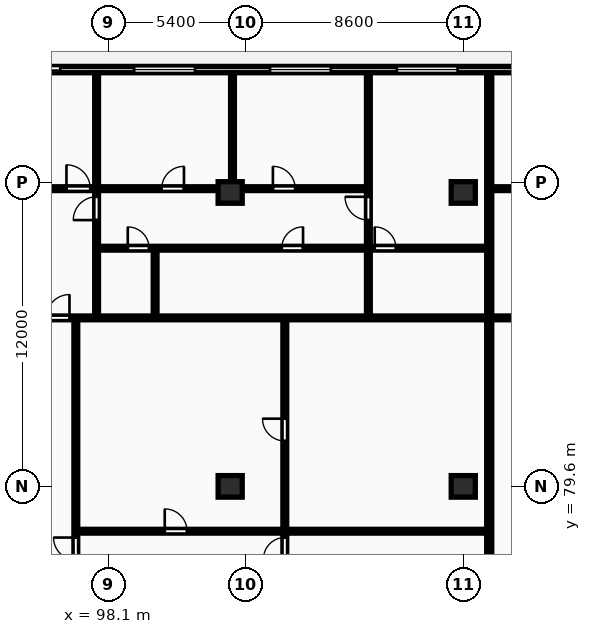
"""IFC4 building model, lengths in metres.
Left out: names, types, materials, properties, quantities, classifications, styles, units other than length and angle.
Written with IfcOpenShell. Run it as: python <this file> out.ifc"""

import sys

from ifc_helpers import new_model, si_unit, direction, frame, frame_2d, origin, origin_2d, place, context, subcontext, project, spatial, rectangle, extrude, element, fill, save


model = new_model("IFC4")
c1 = context("Model", 3, precision=1e-05, world=origin(), true_north=direction((0.0, 1.0)))
c2 = subcontext(c1, "Body", "Model", "MODEL_VIEW")
j1 = project(units=[si_unit("LENGTHUNIT", "METRE"), si_unit("PLANEANGLEUNIT", "RADIAN")], contexts=[c1])
p1 = place(None, origin())
s1 = spatial("IfcSite", under=j1, at=p1, CompositionType="ELEMENT")
p2 = place(p1, origin())
s2 = spatial("IfcBuilding", under=s1, at=p2, CompositionType="ELEMENT")
p3 = place(p2, frame((0.0, 0.0, 126.3)))
s3 = spatial("IfcBuildingStorey", under=s2, at=p3, CompositionType="ELEMENT", Elevation=126.3)
for number, where, z_axis, x_axis in (
    (1, (102.9, 79.6, 0.0), (0.0, 0.0, 1.0), (1.0, 0.0, 0.0)),
    (2, (102.9, 91.2, 0.0), (0.0, 0.0, 1.0), (1.0, 0.0, 0.0)),
    (3, (112.1, 79.6, 0.0), (0.0, 0.0, 1.0), (1.0, 0.0, 0.0)),
    (4, (112.1, 91.2, 0.0), (0.0, 0.0, 1.0), (1.0, 0.0, 0.0)),
):
    element("IfcColumn", number, at=place(p3, frame(where, z_axis=z_axis, x_axis=x_axis)), inside=s3, PredefinedType="COLUMN", context=c2, shape_type="SweptSolid", body=[
        extrude(rectangle(XDim=0.95, YDim=0.85, at=origin_2d()), origin(), (0.0, 0.0, 1.0), 3.25),
    ])
p4 = place(p3, frame((130.6, 96.05, 0.0), z_axis=(0.0, 0.0, 1.0), x_axis=(-1.0, 0.0, 0.0)))
e5 = element("IfcWall", 5, at=p4, inside=s3, PredefinedType="STANDARD", context=c2, shape_type="SweptSolid", body=[
    extrude(rectangle(XDim=73.0, YDim=0.25, at=frame_2d((36.5, 0.0))), origin(), (0.0, 0.0, 1.0), 2.97),
])
p5 = place(p4, frame((68.591, 0.0, 0.0)))
e6 = element("IfcOpeningElement", 6, at=p5, cuts=e5, PredefinedType="OPENING", context=c2, shape_type="SweptSolid", body=[
    extrude(rectangle(XDim=1.8, YDim=2.2, at=frame_2d((0.9, 1.1))), frame((0.0, 0.135, 0.0), z_axis=(0.0, -1.0, 0.0), x_axis=(1.0, 0.0, 0.0)), (0.0, 0.0, 1.0), 0.27),
])
p6 = place(p4, frame((60.092, 0.0, 0.85)))
e7 = element("IfcOpeningElement", 7, at=p6, cuts=e5, PredefinedType="OPENING", context=c2, shape_type="SweptSolid", body=[
    extrude(rectangle(XDim=2.4, YDim=1.9, at=frame_2d((1.2, 0.95))), frame((0.0, 0.135, 0.0), z_axis=(0.0, -1.0, 0.0), x_axis=(1.0, 0.0, 0.0)), (0.0, 0.0, 1.0), 0.27),
])
p7 = place(p4, frame((51.405, 0.0, 0.0)))
e8 = element("IfcOpeningElement", 8, at=p7, cuts=e5, PredefinedType="OPENING", context=c2, shape_type="SweptSolid", body=[
    extrude(rectangle(XDim=1.8, YDim=2.2, at=frame_2d((0.9, 1.1))), frame((0.0, 0.135, 0.0), z_axis=(0.0, -1.0, 0.0), x_axis=(1.0, 0.0, 0.0)), (0.0, 0.0, 1.0), 0.27),
])
p8 = place(p4, frame((41.925, 0.0, 0.85)))
e9 = element("IfcOpeningElement", 9, at=p8, cuts=e5, PredefinedType="OPENING", context=c2, shape_type="SweptSolid", body=[
    extrude(rectangle(XDim=2.4, YDim=1.9, at=frame_2d((1.2, 0.95))), frame((0.0, 0.135, 0.0), z_axis=(0.0, -1.0, 0.0), x_axis=(1.0, 0.0, 0.0)), (0.0, 0.0, 1.0), 0.27),
])
p9 = place(p4, frame((29.091, 0.0, 0.85)))
e10 = element("IfcOpeningElement", 10, at=p9, cuts=e5, PredefinedType="OPENING", context=c2, shape_type="SweptSolid", body=[
    extrude(rectangle(XDim=2.4, YDim=1.9, at=frame_2d((1.2, 0.95))), frame((0.0, 0.135, 0.0), z_axis=(0.0, -1.0, 0.0), x_axis=(1.0, 0.0, 0.0)), (0.0, 0.0, 1.0), 0.27),
])
p10 = place(p4, frame((23.727, 0.0, 0.85)))
e11 = element("IfcOpeningElement", 11, at=p10, cuts=e5, PredefinedType="OPENING", context=c2, shape_type="SweptSolid", body=[
    extrude(rectangle(XDim=2.4, YDim=1.9, at=frame_2d((1.2, 0.95))), frame((0.0, 0.135, 0.0), z_axis=(0.0, -1.0, 0.0), x_axis=(1.0, 0.0, 0.0)), (0.0, 0.0, 1.0), 0.27),
])
p11 = place(p4, frame((34.407, 0.0, 0.0)))
e12 = element("IfcOpeningElement", 12, at=p11, cuts=e5, PredefinedType="OPENING", context=c2, shape_type="SweptSolid", body=[
    extrude(rectangle(XDim=1.8, YDim=2.2, at=frame_2d((0.9, 1.1))), frame((0.0, 0.135, 0.0), z_axis=(0.0, -1.0, 0.0), x_axis=(1.0, 0.0, 0.0)), (0.0, 0.0, 1.0), 0.27),
])
p12 = place(p4, frame((18.72, 0.0, 0.85)))
e13 = element("IfcOpeningElement", 13, at=p12, cuts=e5, PredefinedType="OPENING", context=c2, shape_type="SweptSolid", body=[
    extrude(rectangle(XDim=2.4, YDim=1.9, at=frame_2d((1.2, 0.95))), frame((0.0, 0.135, 0.0), z_axis=(0.0, -1.0, 0.0), x_axis=(1.0, 0.0, 0.0)), (0.0, 0.0, 1.0), 0.27),
])
p13 = place(p4, frame((9.169, 0.0, 0.85)))
e14 = element("IfcOpeningElement", 14, at=p13, cuts=e5, PredefinedType="OPENING", context=c2, shape_type="SweptSolid", body=[
    extrude(rectangle(XDim=2.4, YDim=1.9, at=frame_2d((1.2, 0.95))), frame((0.0, 0.135, 0.0), z_axis=(0.0, -1.0, 0.0), x_axis=(1.0, 0.0, 0.0)), (0.0, 0.0, 1.0), 0.27),
])
p14 = place(p4, frame((5.506, 0.0, 0.85)))
e15 = element("IfcOpeningElement", 15, at=p14, cuts=e5, PredefinedType="OPENING", context=c2, shape_type="SweptSolid", body=[
    extrude(rectangle(XDim=1.8, YDim=1.8, at=frame_2d((0.9, 0.9))), frame((0.0, 0.135, 0.0), z_axis=(0.0, -1.0, 0.0), x_axis=(1.0, 0.0, 0.0)), (0.0, 0.0, 1.0), 0.27),
])
p15 = place(p4, frame((14.015, 0.0, 0.0)))
e16 = element("IfcOpeningElement", 16, at=p15, cuts=e5, PredefinedType="OPENING", context=c2, shape_type="SweptSolid", body=[
    extrude(rectangle(XDim=1.8, YDim=2.2, at=frame_2d((0.9, 1.1))), frame((0.0, 0.135, 0.0), z_axis=(0.0, -1.0, 0.0), x_axis=(1.0, 0.0, 0.0)), (0.0, 0.0, 1.0), 0.27),
])
p16 = place(p4, frame((1.135, 0.0, 0.85)))
e17 = element("IfcOpeningElement", 17, at=p16, cuts=e5, PredefinedType="OPENING", context=c2, shape_type="SweptSolid", body=[
    extrude(rectangle(XDim=2.4, YDim=1.9, at=frame_2d((1.2, 0.95))), frame((0.0, 0.135, 0.0), z_axis=(0.0, -1.0, 0.0), x_axis=(1.0, 0.0, 0.0)), (0.0, 0.0, 1.0), 0.27),
])
p17 = place(p3, frame((113.125, 69.83, 0.0), z_axis=(0.0, 0.0, 1.0), x_axis=(0.0, 1.0, 0.0)))
e18 = element("IfcWall", 18, at=p17, inside=s3, PredefinedType="PARTITIONING", context=c2, shape_type="SweptSolid", body=[
    extrude(rectangle(XDim=26.07, YDim=0.2, at=frame_2d((13.035, 0.0))), origin(), (0.0, 0.0, 1.0), 2.97),
])
p18 = place(p3, frame((105.056, 69.81, 0.0), z_axis=(0.0, 0.0, 1.0), x_axis=(0.0, 1.0, 0.0)))
e19 = element("IfcWall", 19, at=p18, inside=s3, PredefinedType="PARTITIONING", context=c2, shape_type="SweptSolid", body=[
    extrude(rectangle(XDim=16.4, YDim=0.15, at=frame_2d((8.2, 0.0))), origin(), (0.0, 0.0, 1.0), 2.97),
])
p19 = place(p18, frame((6.93, 0.0, 0.0)))
e20 = element("IfcOpeningElement", 20, at=p19, cuts=e19, PredefinedType="OPENING", context=c2, shape_type="SweptSolid", body=[
    extrude(rectangle(XDim=0.84, YDim=2.04, at=frame_2d((0.42, 1.02))), frame((0.0, 0.085, 0.0), z_axis=(0.0, -1.0, 0.0), x_axis=(1.0, 0.0, 0.0)), (0.0, 0.0, 1.0), 0.17),
])
p20 = place(p18, frame((11.582, 0.0, 0.0)))
e21 = element("IfcOpeningElement", 21, at=p20, cuts=e19, PredefinedType="OPENING", context=c2, shape_type="SweptSolid", body=[
    extrude(rectangle(XDim=0.88, YDim=2.06, at=frame_2d((0.44, 1.03))), frame((0.0, 0.085, 0.0), z_axis=(0.0, -1.0, 0.0), x_axis=(1.0, 0.0, 0.0)), (0.0, 0.0, 1.0), 0.17),
])
p21 = place(p3, frame((96.867, 77.83, 0.0), z_axis=(0.0, 0.0, 1.0), x_axis=(1.0, 0.0, 0.0)))
e22 = element("IfcWall", 22, at=p21, inside=s3, PredefinedType="PARTITIONING", context=c2, shape_type="SweptSolid", body=[
    extrude(rectangle(XDim=16.177, YDim=0.15, at=frame_2d((8.089, 0.0))), origin(), (0.0, 0.0, 1.0), 2.97),
])
p22 = place(p21, frame((3.45, 0.0, 0.0)))
e23 = element("IfcOpeningElement", 23, at=p22, cuts=e22, PredefinedType="OPENING", context=c2, shape_type="SweptSolid", body=[
    extrude(rectangle(XDim=0.88, YDim=2.06, at=frame_2d((0.44, 1.03))), frame((0.0, 0.085, 0.0), z_axis=(0.0, -1.0, 0.0), x_axis=(1.0, 0.0, 0.0)), (0.0, 0.0, 1.0), 0.17),
])
p23 = place(p3, frame((96.808, 69.81, 0.0), z_axis=(0.0, 0.0, 1.0), x_axis=(0.0, 1.0, 0.0)))
e24 = element("IfcWall", 24, at=p23, inside=s3, PredefinedType="PARTITIONING", context=c2, shape_type="SweptSolid", body=[
    extrude(rectangle(XDim=16.4, YDim=0.15, at=frame_2d((8.2, 0.0))), origin(), (0.0, 0.0, 1.0), 2.97),
])
p24 = place(p23, frame((6.89, 0.0, 0.0)))
e25 = element("IfcOpeningElement", 25, at=p24, cuts=e24, PredefinedType="OPENING", context=c2, shape_type="SweptSolid", body=[
    extrude(rectangle(XDim=0.88, YDim=2.06, at=frame_2d((0.44, 1.03))), frame((0.0, 0.085, 0.0), z_axis=(0.0, -1.0, 0.0), x_axis=(1.0, 0.0, 0.0)), (0.0, 0.0, 1.0), 0.17),
])
p25 = place(p3, frame((99.938, 86.29, 0.0), z_axis=(0.0, 0.0, 1.0), x_axis=(0.0, 1.0, 0.0)))
e26 = element("IfcWall", 26, at=p25, inside=s3, PredefinedType="PARTITIONING", context=c2, shape_type="SweptSolid", body=[
    extrude(rectangle(XDim=2.69, YDim=0.15, at=frame_2d((1.345, 0.0))), origin(), (0.0, 0.0, 1.0), 2.97),
])
p26 = place(p3, frame((102.991, 91.43, 0.0), z_axis=(0.0, 0.0, 1.0), x_axis=(0.0, 1.0, 0.0)))
e27 = element("IfcWall", 27, at=p26, inside=s3, PredefinedType="PARTITIONING", context=c2, shape_type="SweptSolid", body=[
    extrude(rectangle(XDim=4.47, YDim=0.15, at=frame_2d((2.235, 0.0))), origin(), (0.0, 0.0, 1.0), 2.97),
])
p27 = place(p3, frame((97.627, 86.29, 0.0), z_axis=(0.0, 0.0, 1.0), x_axis=(0.0, 1.0, 0.0)))
e28 = element("IfcWall", 28, at=p27, inside=s3, PredefinedType="PARTITIONING", context=c2, shape_type="SweptSolid", body=[
    extrude(rectangle(XDim=9.61, YDim=0.15, at=frame_2d((4.805, 0.0))), origin(), (0.0, 0.0, 1.0), 2.97),
])
p28 = place(p27, frame((3.82, 0.0, 0.0)))
e29 = element("IfcOpeningElement", 29, at=p28, cuts=e28, PredefinedType="OPENING", context=c2, shape_type="SweptSolid", body=[
    extrude(rectangle(XDim=0.92, YDim=2.08, at=frame_2d((0.46, 1.04))), frame((0.0, 0.085, 0.0), z_axis=(0.0, -1.0, 0.0), x_axis=(1.0, 0.0, 0.0)), (0.0, 0.0, 1.0), 0.17),
])
p29 = place(p3, frame((108.355, 86.29, 0.0), z_axis=(0.0, 0.0, 1.0), x_axis=(0.0, 1.0, 0.0)))
e30 = element("IfcWall", 30, at=p29, inside=s3, PredefinedType="PARTITIONING", context=c2, shape_type="SweptSolid", body=[
    extrude(rectangle(XDim=2.69, YDim=0.15, at=frame_2d((1.345, 0.0))), origin(), (0.0, 0.0, 1.0), 2.97),
])
p30 = place(p3, frame((108.355, 89.02, 0.0), z_axis=(0.0, 0.0, 1.0), x_axis=(0.0, 1.0, 0.0)))
e31 = element("IfcWall", 31, at=p30, inside=s3, PredefinedType="PARTITIONING", context=c2, shape_type="SweptSolid", body=[
    extrude(rectangle(XDim=6.88, YDim=0.15, at=frame_2d((3.44, 0.0))), origin(), (0.0, 0.0, 1.0), 2.97),
])
p31 = place(p30, frame((1.09, 0.0, 0.0)))
e32 = element("IfcOpeningElement", 32, at=p31, cuts=e31, PredefinedType="OPENING", context=c2, shape_type="SweptSolid", body=[
    extrude(rectangle(XDim=0.92, YDim=2.08, at=frame_2d((0.46, 1.04))), frame((0.0, 0.085, 0.0), z_axis=(0.0, -1.0, 0.0), x_axis=(1.0, 0.0, 0.0)), (0.0, 0.0, 1.0), 0.17),
])
p32 = place(p3, frame((97.667, 89.0, 0.0), z_axis=(0.0, 0.0, 1.0), x_axis=(1.0, 0.0, 0.0)))
e33 = element("IfcWall", 33, at=p32, inside=s3, PredefinedType="PARTITIONING", context=c2, shape_type="SweptSolid", body=[
    extrude(rectangle(XDim=15.377, YDim=0.15, at=frame_2d((7.689, 0.0))), origin(), (0.0, 0.0, 1.0), 2.97),
])
p33 = place(p32, frame((1.191, 0.0, 0.0)))
e34 = element("IfcOpeningElement", 34, at=p33, cuts=e33, PredefinedType="OPENING", context=c2, shape_type="SweptSolid", body=[
    extrude(rectangle(XDim=0.84, YDim=2.04, at=frame_2d((0.42, 1.02))), frame((0.0, 0.085, 0.0), z_axis=(0.0, -1.0, 0.0), x_axis=(1.0, 0.0, 0.0)), (0.0, 0.0, 1.0), 0.17),
])
p34 = place(p32, frame((7.269, 0.0, 0.0)))
e35 = element("IfcOpeningElement", 35, at=p34, cuts=e33, PredefinedType="OPENING", context=c2, shape_type="SweptSolid", body=[
    extrude(rectangle(XDim=0.84, YDim=2.04, at=frame_2d((0.42, 1.02))), frame((0.0, 0.085, 0.0), z_axis=(0.0, -1.0, 0.0), x_axis=(1.0, 0.0, 0.0)), (0.0, 0.0, 1.0), 0.17),
])
p35 = place(p32, frame((10.938, 0.0, 0.0)))
e36 = element("IfcOpeningElement", 36, at=p35, cuts=e33, PredefinedType="OPENING", context=c2, shape_type="SweptSolid", body=[
    extrude(rectangle(XDim=0.84, YDim=2.04, at=frame_2d((0.42, 1.02))), frame((0.0, 0.085, 0.0), z_axis=(0.0, -1.0, 0.0), x_axis=(1.0, 0.0, 0.0)), (0.0, 0.0, 1.0), 0.17),
])
p36 = place(p3, frame((92.917, 86.25, 0.0), z_axis=(0.0, 0.0, 1.0), x_axis=(1.0, 0.0, 0.0)))
e37 = element("IfcWall", 37, at=p36, inside=s3, PredefinedType="PARTITIONING", context=c2, shape_type="SweptSolid", body=[
    extrude(rectangle(XDim=20.127, YDim=0.15, at=frame_2d((10.064, 0.0))), origin(), (0.0, 0.0, 1.0), 2.97),
])
p37 = place(p36, frame((2.72, 0.0, 0.0)))
e38 = element("IfcOpeningElement", 38, at=p37, cuts=e37, PredefinedType="OPENING", context=c2, shape_type="SweptSolid", body=[
    extrude(rectangle(XDim=0.92, YDim=2.08, at=frame_2d((0.46, 1.04))), frame((0.0, 0.085, 0.0), z_axis=(0.0, -1.0, 0.0), x_axis=(1.0, 0.0, 0.0)), (0.0, 0.0, 1.0), 0.17),
])
p38 = place(p3, frame((92.917, 91.35, 0.0), z_axis=(0.0, 0.0, 1.0), x_axis=(1.0, 0.0, 0.0)))
e39 = element("IfcWall", 39, at=p38, inside=s3, PredefinedType="PARTITIONING", context=c2, shape_type="SweptSolid", body=[
    extrude(rectangle(XDim=15.438, YDim=0.15, at=frame_2d((7.719, 0.0))), origin(), (0.0, 0.0, 1.0), 2.663),
])
p39 = place(p38, frame((3.52, 0.0, 0.0)))
e40 = element("IfcOpeningElement", 40, at=p39, cuts=e39, PredefinedType="OPENING", context=c2, shape_type="SweptSolid", body=[
    extrude(rectangle(XDim=0.94, YDim=2.1, at=frame_2d((0.47, 1.05))), frame((0.0, 0.085, 0.0), z_axis=(0.0, -1.0, 0.0), x_axis=(1.0, 0.0, 0.0)), (0.0, 0.0, 1.0), 0.17),
])
p40 = place(p38, frame((7.279, 0.0, 0.0)))
e41 = element("IfcOpeningElement", 41, at=p40, cuts=e39, PredefinedType="OPENING", context=c2, shape_type="SweptSolid", body=[
    extrude(rectangle(XDim=0.88, YDim=2.06, at=frame_2d((0.44, 1.03))), frame((0.0, 0.085, 0.0), z_axis=(0.0, -1.0, 0.0), x_axis=(1.0, 0.0, 0.0)), (0.0, 0.0, 1.0), 0.17),
])
p41 = place(p38, frame((11.669, 0.0, 0.0)))
e42 = element("IfcOpeningElement", 42, at=p41, cuts=e39, PredefinedType="OPENING", context=c2, shape_type="SweptSolid", body=[
    extrude(rectangle(XDim=0.88, YDim=2.06, at=frame_2d((0.44, 1.03))), frame((0.0, 0.085, 0.0), z_axis=(0.0, -1.0, 0.0), x_axis=(1.0, 0.0, 0.0)), (0.0, 0.0, 1.0), 0.17),
])
p42 = place(p3, frame((113.205, 86.25, 0.0), z_axis=(0.0, 0.0, 1.0), x_axis=(1.0, 0.0, 0.0)))
e43 = element("IfcWall", 43, at=p42, inside=s3, PredefinedType="PARTITIONING", context=c2, shape_type="SweptSolid", body=[
    extrude(rectangle(XDim=17.315, YDim=0.15, at=frame_2d((8.657, 0.0))), origin(), (0.0, 0.0, 1.0), 2.97),
])
p43 = place(p42, frame((2.72, 0.0, 0.0)))
e44 = element("IfcOpeningElement", 44, at=p43, cuts=e43, PredefinedType="OPENING", context=c2, shape_type="SweptSolid", body=[
    extrude(rectangle(XDim=0.92, YDim=2.08, at=frame_2d((0.46, 1.04))), frame((0.0, 0.085, 0.0), z_axis=(0.0, -1.0, 0.0), x_axis=(1.0, 0.0, 0.0)), (0.0, 0.0, 1.0), 0.17),
])
p44 = place(p3, frame((113.205, 91.35, 0.0), z_axis=(0.0, 0.0, 1.0), x_axis=(1.0, 0.0, 0.0)))
e45 = element("IfcWall", 45, at=p44, inside=s3, PredefinedType="PARTITIONING", context=c2, shape_type="SweptSolid", body=[
    extrude(rectangle(XDim=12.845, YDim=0.15, at=frame_2d((6.422, 0.0))), origin(), (0.0, 0.0, 1.0), 2.663),
])
p45 = place(p44, frame((3.73, 0.0, 0.0)))
e46 = element("IfcOpeningElement", 46, at=p45, cuts=e45, PredefinedType="OPENING", context=c2, shape_type="SweptSolid", body=[
    extrude(rectangle(XDim=0.94, YDim=2.1, at=frame_2d((0.47, 1.05))), frame((0.0, 0.085, 0.0), z_axis=(0.0, -1.0, 0.0), x_axis=(1.0, 0.0, 0.0)), (0.0, 0.0, 1.0), 0.17),
])
p46 = place(p44, frame((5.14, 0.0, 0.0)))
e47 = element("IfcOpeningElement", 47, at=p46, cuts=e45, PredefinedType="OPENING", context=c2, shape_type="SweptSolid", body=[
    extrude(rectangle(XDim=0.88, YDim=2.06, at=frame_2d((0.44, 1.03))), frame((0.0, 0.085, 0.0), z_axis=(0.0, -1.0, 0.0), x_axis=(1.0, 0.0, 0.0)), (0.0, 0.0, 1.0), 0.17),
])
p47 = place(p44, frame((9.4, 0.0, 0.0)))
e48 = element("IfcOpeningElement", 48, at=p47, cuts=e45, PredefinedType="OPENING", context=c2, shape_type="SweptSolid", body=[
    extrude(rectangle(XDim=0.88, YDim=2.06, at=frame_2d((0.44, 1.03))), frame((0.0, 0.085, 0.0), z_axis=(0.0, -1.0, 0.0), x_axis=(1.0, 0.0, 0.0)), (0.0, 0.0, 1.0), 0.17),
])
p48 = place(p9, origin())
e49 = element("IfcWindow", 49, at=p48, inside=s3, PartitioningType="DOUBLE_PANEL_VERTICAL", PredefinedType="WINDOW", context=c2, shape_type="SweptSolid", body=[
    extrude(rectangle(XDim=2.4, YDim=1.9, at=frame_2d((1.2, 0.95))), frame((0.0, 0.03, 0.0), z_axis=(0.0, -1.0, 0.0), x_axis=(1.0, 0.0, 0.0)), (0.0, 0.0, 1.0), 0.06),
])
fill(e10, e49)
p49 = place(p10, origin())
e50 = element("IfcWindow", 50, at=p49, inside=s3, PartitioningType="DOUBLE_PANEL_VERTICAL", PredefinedType="WINDOW", context=c2, shape_type="SweptSolid", body=[
    extrude(rectangle(XDim=2.4, YDim=1.9, at=frame_2d((1.2, 0.95))), frame((0.0, 0.03, 0.0), z_axis=(0.0, -1.0, 0.0), x_axis=(1.0, 0.0, 0.0)), (0.0, 0.0, 1.0), 0.06),
])
fill(e11, e50)
p50 = place(p11, origin())
e51 = element("IfcDoor", 51, at=p50, inside=s3, OperationType="SLIDING_TO_LEFT", PredefinedType="DOOR", context=c2, shape_type="SweptSolid", body=[
    extrude(rectangle(XDim=1.8, YDim=2.2, at=frame_2d((0.9, 1.1))), frame((0.0, 0.025, 0.0), z_axis=(0.0, -1.0, 0.0), x_axis=(1.0, 0.0, 0.0)), (0.0, 0.0, 1.0), 0.05),
])
fill(e12, e51)
p51 = place(p12, origin())
e52 = element("IfcWindow", 52, at=p51, inside=s3, PartitioningType="DOUBLE_PANEL_VERTICAL", PredefinedType="WINDOW", context=c2, shape_type="SweptSolid", body=[
    extrude(rectangle(XDim=2.4, YDim=1.9, at=frame_2d((1.2, 0.95))), frame((0.0, 0.03, 0.0), z_axis=(0.0, -1.0, 0.0), x_axis=(1.0, 0.0, 0.0)), (0.0, 0.0, 1.0), 0.06),
])
fill(e13, e52)
p52 = place(p19, origin())
e53 = element("IfcDoor", 53, at=p52, inside=s3, OperationType="SINGLE_SWING_LEFT", PredefinedType="DOOR", context=c2, shape_type="SweptSolid", body=[
    extrude(rectangle(XDim=0.84, YDim=2.04, at=frame_2d((0.42, 1.02))), frame((0.0, 0.025, 0.0), z_axis=(0.0, -1.0, 0.0), x_axis=(1.0, 0.0, 0.0)), (0.0, 0.0, 1.0), 0.05),
])
fill(e20, e53)
p53 = place(p20, origin())
e54 = element("IfcDoor", 54, at=p53, inside=s3, OperationType="SINGLE_SWING_RIGHT", PredefinedType="DOOR", context=c2, shape_type="SweptSolid", body=[
    extrude(rectangle(XDim=0.88, YDim=2.06, at=frame_2d((0.44, 1.03))), frame((0.0, 0.025, 0.0), z_axis=(0.0, -1.0, 0.0), x_axis=(1.0, 0.0, 0.0)), (0.0, 0.0, 1.0), 0.05),
])
fill(e21, e54)
p54 = place(p22, origin())
e55 = element("IfcDoor", 55, at=p54, inside=s3, OperationType="SINGLE_SWING_LEFT", PredefinedType="DOOR", context=c2, shape_type="SweptSolid", body=[
    extrude(rectangle(XDim=0.88, YDim=2.06, at=frame_2d((0.44, 1.03))), frame((0.0, 0.025, 0.0), z_axis=(0.0, -1.0, 0.0), x_axis=(1.0, 0.0, 0.0)), (0.0, 0.0, 1.0), 0.05),
])
fill(e23, e55)
p55 = place(p24, origin())
e56 = element("IfcDoor", 56, at=p55, inside=s3, OperationType="SINGLE_SWING_RIGHT", PredefinedType="DOOR", context=c2, shape_type="SweptSolid", body=[
    extrude(rectangle(XDim=0.88, YDim=2.06, at=frame_2d((0.44, 1.03))), frame((0.0, 0.025, 0.0), z_axis=(0.0, -1.0, 0.0), x_axis=(1.0, 0.0, 0.0)), (0.0, 0.0, 1.0), 0.05),
])
fill(e25, e56)
p56 = place(p28, origin())
e57 = element("IfcDoor", 57, at=p56, inside=s3, OperationType="SINGLE_SWING_LEFT", PredefinedType="DOOR", context=c2, shape_type="SweptSolid", body=[
    extrude(rectangle(XDim=0.92, YDim=2.08, at=frame_2d((0.46, 1.04))), frame((0.0, 0.025, 0.0), z_axis=(0.0, -1.0, 0.0), x_axis=(1.0, 0.0, 0.0)), (0.0, 0.0, 1.0), 0.05),
])
fill(e29, e57)
p57 = place(p31, origin())
e58 = element("IfcDoor", 58, at=p57, inside=s3, OperationType="SINGLE_SWING_RIGHT", PredefinedType="DOOR", context=c2, shape_type="SweptSolid", body=[
    extrude(rectangle(XDim=0.92, YDim=2.08, at=frame_2d((0.46, 1.04))), frame((0.0, 0.025, 0.0), z_axis=(0.0, -1.0, 0.0), x_axis=(1.0, 0.0, 0.0)), (0.0, 0.0, 1.0), 0.05),
])
fill(e32, e58)
p58 = place(p33, origin())
e59 = element("IfcDoor", 59, at=p58, inside=s3, OperationType="SINGLE_SWING_LEFT", PredefinedType="DOOR", context=c2, shape_type="SweptSolid", body=[
    extrude(rectangle(XDim=0.84, YDim=2.04, at=frame_2d((0.42, 1.02))), frame((0.0, 0.025, 0.0), z_axis=(0.0, -1.0, 0.0), x_axis=(1.0, 0.0, 0.0)), (0.0, 0.0, 1.0), 0.05),
])
fill(e34, e59)
p59 = place(p34, origin())
e60 = element("IfcDoor", 60, at=p59, inside=s3, OperationType="SINGLE_SWING_RIGHT", PredefinedType="DOOR", context=c2, shape_type="SweptSolid", body=[
    extrude(rectangle(XDim=0.84, YDim=2.04, at=frame_2d((0.42, 1.02))), frame((0.0, 0.025, 0.0), z_axis=(0.0, -1.0, 0.0), x_axis=(1.0, 0.0, 0.0)), (0.0, 0.0, 1.0), 0.05),
])
fill(e35, e60)
p60 = place(p35, origin())
e61 = element("IfcDoor", 61, at=p60, inside=s3, OperationType="SINGLE_SWING_LEFT", PredefinedType="DOOR", context=c2, shape_type="SweptSolid", body=[
    extrude(rectangle(XDim=0.84, YDim=2.04, at=frame_2d((0.42, 1.02))), frame((0.0, 0.025, 0.0), z_axis=(0.0, -1.0, 0.0), x_axis=(1.0, 0.0, 0.0)), (0.0, 0.0, 1.0), 0.05),
])
fill(e36, e61)
p61 = place(p37, origin())
e62 = element("IfcDoor", 62, at=p61, inside=s3, OperationType="SINGLE_SWING_RIGHT", PredefinedType="DOOR", context=c2, shape_type="SweptSolid", body=[
    extrude(rectangle(XDim=0.92, YDim=2.08, at=frame_2d((0.46, 1.04))), frame((0.0, 0.025, 0.0), z_axis=(0.0, -1.0, 0.0), x_axis=(1.0, 0.0, 0.0)), (0.0, 0.0, 1.0), 0.05),
])
fill(e38, e62)
p62 = place(p39, origin())
e63 = element("IfcDoor", 63, at=p62, inside=s3, OperationType="SINGLE_SWING_LEFT", PredefinedType="DOOR", context=c2, shape_type="SweptSolid", body=[
    extrude(rectangle(XDim=0.94, YDim=2.1, at=frame_2d((0.47, 1.05))), frame((0.0, 0.025, 0.0), z_axis=(0.0, -1.0, 0.0), x_axis=(1.0, 0.0, 0.0)), (0.0, 0.0, 1.0), 0.05),
])
fill(e40, e63)
p63 = place(p40, origin())
e64 = element("IfcDoor", 64, at=p63, inside=s3, OperationType="SINGLE_SWING_RIGHT", PredefinedType="DOOR", context=c2, shape_type="SweptSolid", body=[
    extrude(rectangle(XDim=0.88, YDim=2.06, at=frame_2d((0.44, 1.03))), frame((0.0, 0.025, 0.0), z_axis=(0.0, -1.0, 0.0), x_axis=(1.0, 0.0, 0.0)), (0.0, 0.0, 1.0), 0.05),
])
fill(e41, e64)
p64 = place(p41, origin())
e65 = element("IfcDoor", 65, at=p64, inside=s3, OperationType="SINGLE_SWING_LEFT", PredefinedType="DOOR", context=c2, shape_type="SweptSolid", body=[
    extrude(rectangle(XDim=0.88, YDim=2.06, at=frame_2d((0.44, 1.03))), frame((0.0, 0.025, 0.0), z_axis=(0.0, -1.0, 0.0), x_axis=(1.0, 0.0, 0.0)), (0.0, 0.0, 1.0), 0.05),
])
fill(e42, e65)
save(model, sys.argv[1])
